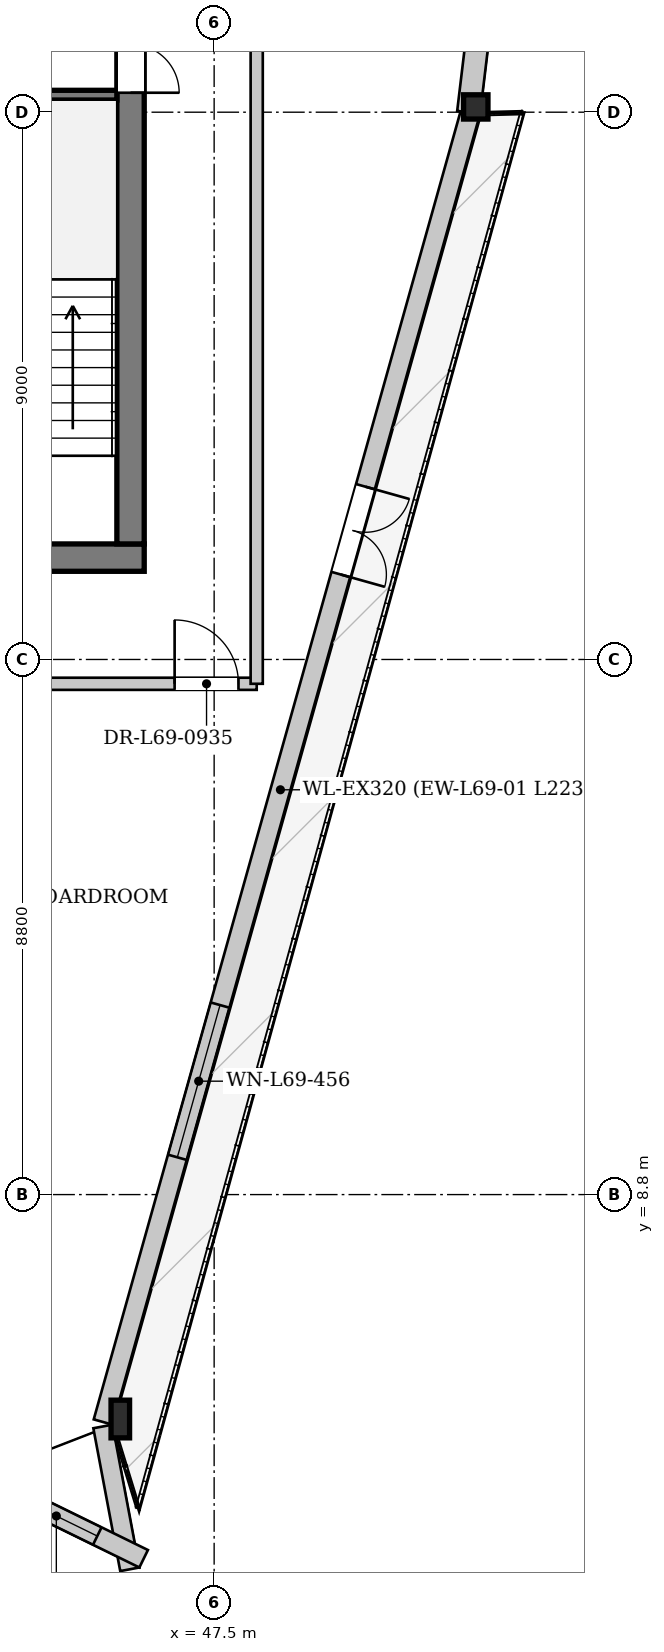
"""IFC4 building model, lengths in metres.
Left out: names, types, materials, properties, quantities, classifications, styles, units other than length and angle.
Written with IfcOpenShell. Run it as: python <this file> out.ifc"""

import sys

from ifc_helpers import new_model, si_unit, direction, frame, frame_2d, origin, origin_2d, place, context, subcontext, project, spatial, rectangle, i_section, extrude, source, transform, mapped, element, fill, save


model = new_model("IFC4")
c1 = context("Model", 3, precision=1e-05, world=origin(), true_north=direction((0.0, 1.0)))
c2 = subcontext(c1, "Body", "Model", "MODEL_VIEW")
j1 = project(units=[si_unit("LENGTHUNIT", "METRE"), si_unit("PLANEANGLEUNIT", "RADIAN")], contexts=[c1])
p1 = place(None, origin())
s1 = spatial("IfcSite", under=j1, at=p1, CompositionType="ELEMENT")
p2 = place(p1, origin())
s2 = spatial("IfcBuilding", under=s1, at=p2, CompositionType="ELEMENT")
p3 = place(p2, frame((0.0, 0.0, 259.7)))
s3 = spatial("IfcBuildingStorey", under=s2, at=p3, CompositionType="ELEMENT", Elevation=259.7)
m1 = source(origin(), c2, "Body", "SweptSolid", [
    extrude(i_section(OverallWidth=0.305, OverallDepth=0.62, WebThickness=0.021, FlangeThickness=0.04, at=origin_2d()), origin(), (0.0, 0.0, 1.0), 3.45),
])
p4 = place(p3, frame((45.828, 5.017, 0.0), z_axis=(0.074735037685, 0.05364503652, 0.995759450971), x_axis=(-0.583128682358, 0.812379800224, 0.0)))
e1 = element("IfcColumn", 1, at=p4, inside=s3, PredefinedType="COLUMN", context=c2, shape_type="MappedRepresentation", body=[
    mapped(m1, transform((0.0, 0.0, 0.0), x_axis=(1.0, 0.0, 0.0), y_axis=(0.0, 1.0, 0.0), z_axis=(0.0, 0.0, 1.0), scale=1.0)),
])
m2 = source(origin(), c2, "Body", "SweptSolid", [
    extrude(i_section(OverallWidth=0.401, OverallDepth=0.399, WebThickness=0.022, FlangeThickness=0.034, at=origin_2d()), origin(), (0.0, 0.0, 1.0), 3.445),
])
p5 = place(p3, frame((51.875, 26.575, 0.0), z_axis=(-0.04145470851, 0.064768553126, 0.997038886738), x_axis=(-0.842254664655, -0.53907984554, 0.0)))
e2 = element("IfcColumn", 2, at=p5, inside=s3, PredefinedType="COLUMN", context=c2, shape_type="MappedRepresentation", body=[
    mapped(m2, transform((0.0, 0.0, 0.0), x_axis=(1.0, 0.0, 0.0), y_axis=(0.0, 1.0, 0.0), z_axis=(0.0, 0.0, 1.0), scale=1.0)),
])
p6 = place(p3, frame((51.72, 26.618, 0.0), z_axis=(0.0, 0.0, 1.0), x_axis=(-0.270053350252, -0.962845360386, 0.0)))
e3 = element("IfcWall", 3, at=p6, inside=s3, PredefinedType="SOLIDWALL", context=c2, shape_type="SweptSolid", body=[
    extrude(rectangle(XDim=22.391, YDim=0.32, at=frame_2d((11.195, 0.0))), origin(), (0.0, 0.0, 1.0), 2.872),
])
p7 = place(p6, frame((6.415, 0.0, 0.0)))
e4 = element("IfcOpeningElement", 4, at=p7, cuts=e3, PredefinedType="OPENING", context=c2, shape_type="SweptSolid", body=[
    extrude(rectangle(XDim=1.5, YDim=2.3, at=frame_2d((0.75, 1.15))), frame((0.0, 0.17, 0.0), z_axis=(0.0, -1.0, 0.0), x_axis=(1.0, 0.0, 0.0)), (0.0, 0.0, 1.0), 0.34),
])
p8 = place(p6, frame((15.269, 0.0, 0.402)))
e5 = element("IfcOpeningElement", 5, at=p8, cuts=e3, PredefinedType="OPENING", context=c2, shape_type="SweptSolid", body=[
    extrude(rectangle(XDim=2.6, YDim=2.35, at=frame_2d((1.3, 1.175))), frame((0.0, 0.17, 0.0), z_axis=(0.0, -1.0, 0.0), x_axis=(1.0, 0.0, 0.0)), (0.0, 0.0, 1.0), 0.34),
])
p9 = place(p3, frame((45.671, 4.987, 0.0), z_axis=(0.0, 0.0, 1.0), x_axis=(0.184966822966, -0.982744765645, 0.0)))
e6 = element("IfcWall", 6, at=p9, inside=s3, PredefinedType="SOLIDWALL", context=c2, shape_type="SweptSolid", body=[
    extrude(rectangle(XDim=2.39, YDim=0.32, at=frame_2d((1.195, 0.0))), origin(), (0.0, 0.0, 1.0), 2.872),
])
p10 = place(p3, frame((46.341, 2.811, 0.0), z_axis=(0.0, 0.0, 1.0), x_axis=(-0.89810639804, 0.439778237068, 0.0)))
e7 = element("IfcWall", 7, at=p10, inside=s3, PredefinedType="SOLIDWALL", context=c2, shape_type="SweptSolid", body=[
    extrude(rectangle(XDim=3.198, YDim=0.32, at=frame_2d((1.599, 0.0))), origin(), (0.0, 0.0, 1.0), 2.872),
])
p11 = place(p10, frame((0.849, 0.0, 0.452)))
e8 = element("IfcOpeningElement", 8, at=p11, cuts=e7, PredefinedType="OPENING", context=c2, shape_type="SweptSolid", body=[
    extrude(rectangle(XDim=1.5, YDim=2.3, at=frame_2d((0.75, 1.15))), frame((0.0, 0.17, 0.0), z_axis=(0.0, -1.0, 0.0), x_axis=(1.0, 0.0, 0.0)), (0.0, 0.0, 1.0), 0.34),
])
p12 = place(p3, frame((54.35, 48.829, 0.0), z_axis=(0.0, 0.0, 1.0), x_axis=(-0.118981834581, -0.992896431175, 0.0)))
e9 = element("IfcWall", 9, at=p12, inside=s3, PredefinedType="SOLIDWALL", context=c2, shape_type="SweptSolid", body=[
    extrude(rectangle(XDim=22.39, YDim=0.38, at=frame_2d((11.195, 0.0))), origin(), (0.0, 0.0, 1.0), 2.872),
])
p13 = place(p12, frame((5.169, 0.0, 0.502)))
e10 = element("IfcOpeningElement", 10, at=p13, cuts=e9, PredefinedType="OPENING", context=c2, shape_type="SweptSolid", body=[
    extrude(rectangle(XDim=2.2, YDim=2.25, at=frame_2d((1.1, 1.125))), frame((0.0, 0.2, 0.0), z_axis=(0.0, -1.0, 0.0), x_axis=(1.0, 0.0, 0.0)), (0.0, 0.0, 1.0), 0.4),
])
p14 = place(p12, frame((15.021, 0.0, 0.502)))
e11 = element("IfcOpeningElement", 11, at=p14, cuts=e9, PredefinedType="OPENING", context=c2, shape_type="SweptSolid", body=[
    extrude(rectangle(XDim=2.2, YDim=2.25, at=frame_2d((1.1, 1.125))), frame((0.0, 0.2, 0.0), z_axis=(0.0, -1.0, 0.0), x_axis=(1.0, 0.0, 0.0)), (0.0, 0.0, 1.0), 0.4),
])
p15 = place(p3, frame((46.35, 19.275, 0.0), z_axis=(0.0, 0.0, 1.0), x_axis=(-1.0, 0.0, 0.0)))
e12 = element("IfcWall", 12, at=p15, inside=s3, PredefinedType="SHEAR", context=c2, shape_type="SweptSolid", body=[
    extrude(rectangle(XDim=16.7, YDim=0.45, at=frame_2d((8.35, 0.0))), origin(), (0.0, 0.0, 1.0), 3.38),
])
p16 = place(p15, frame((4.55, 0.0, 0.0)))
e13 = element("IfcOpeningElement", 13, at=p16, cuts=e12, PredefinedType="OPENING", context=c2, shape_type="SweptSolid", body=[
    extrude(rectangle(XDim=1.12, YDim=2.25, at=frame_2d((0.56, 1.125))), frame((0.0, 0.235, 0.0), z_axis=(0.0, -1.0, 0.0), x_axis=(1.0, 0.0, 0.0)), (0.0, 0.0, 1.0), 0.47),
])
p17 = place(p15, frame((11.05, 0.0, 0.0)))
e14 = element("IfcOpeningElement", 14, at=p17, cuts=e12, PredefinedType="OPENING", context=c2, shape_type="SweptSolid", body=[
    extrude(rectangle(XDim=1.12, YDim=2.25, at=frame_2d((0.56, 1.125))), frame((0.0, 0.235, 0.0), z_axis=(0.0, -1.0, 0.0), x_axis=(1.0, 0.0, 0.0)), (0.0, 0.0, 1.0), 0.47),
])
p18 = place(p3, frame((46.125, 33.7, 0.0), z_axis=(0.0, 0.0, 1.0), x_axis=(0.0, -1.0, 0.0)))
e15 = element("IfcWall", 15, at=p18, inside=s3, PredefinedType="SHEAR", context=c2, shape_type="SweptSolid", body=[
    extrude(rectangle(XDim=14.2, YDim=0.45, at=frame_2d((7.1, 0.0))), origin(), (0.0, 0.0, 1.0), 3.38),
])
p19 = place(p18, frame((5.18, 0.0, 0.0)))
e16 = element("IfcOpeningElement", 16, at=p19, cuts=e15, PredefinedType="OPENING", context=c2, shape_type="SweptSolid", body=[
    extrude(rectangle(XDim=1.6, YDim=2.2, at=frame_2d((0.8, 1.1))), frame((0.0, 0.235, 0.0), z_axis=(0.0, -1.0, 0.0), x_axis=(1.0, 0.0, 0.0)), (0.0, 0.0, 1.0), 0.47),
])
p20 = place(p18, frame((2.05, 0.0, 0.0)))
e17 = element("IfcOpeningElement", 17, at=p20, cuts=e15, PredefinedType="OPENING", context=c2, shape_type="SweptSolid", body=[
    extrude(rectangle(XDim=0.95, YDim=2.1, at=frame_2d((0.475, 1.05))), frame((0.0, 0.235, 0.0), z_axis=(0.0, -1.0, 0.0), x_axis=(1.0, 0.0, 0.0)), (0.0, 0.0, 1.0), 0.47),
])
p21 = place(p3, frame((42.88, 26.88, 0.0), z_axis=(0.0, 0.0, 1.0), x_axis=(1.0, 0.0, 0.0)))
e18 = element("IfcWall", 18, at=p21, inside=s3, PredefinedType="PARTITIONING", context=c2, shape_type="SweptSolid", body=[
    extrude(rectangle(XDim=3.02, YDim=0.16, at=frame_2d((1.51, 0.0))), origin(), (0.0, 0.0, 1.0), 3.38),
])
p22 = place(p3, frame((27.8, 17.2, 0.0), z_axis=(0.0, 0.0, 1.0), x_axis=(1.0, 0.0, 0.0)))
e19 = element("IfcWall", 19, at=p22, inside=s3, PredefinedType="PARTITIONING", context=c2, shape_type="SweptSolid", body=[
    extrude(rectangle(XDim=20.4, YDim=0.2, at=frame_2d((10.2, 0.0))), origin(), (0.0, 0.0, 1.0), 3.38),
])
p23 = place(p22, frame((0.3, 0.0, 0.0)))
e20 = element("IfcOpeningElement", 20, at=p23, cuts=e19, PredefinedType="OPENING", context=c2, shape_type="SweptSolid", body=[
    extrude(rectangle(XDim=1.05, YDim=2.2, at=frame_2d((0.525, 1.1))), frame((0.0, 0.11, 0.0), z_axis=(0.0, -1.0, 0.0), x_axis=(1.0, 0.0, 0.0)), (0.0, 0.0, 1.0), 0.22),
])
p24 = place(p22, frame((19.05, 0.0, 0.0)))
e21 = element("IfcOpeningElement", 21, at=p24, cuts=e19, PredefinedType="OPENING", context=c2, shape_type="SweptSolid", body=[
    extrude(rectangle(XDim=1.05, YDim=2.2, at=frame_2d((0.525, 1.1))), frame((0.0, 0.11, 0.0), z_axis=(0.0, -1.0, 0.0), x_axis=(1.0, 0.0, 0.0)), (0.0, 0.0, 1.0), 0.22),
])
p25 = place(p3, frame((48.2, 17.2, 0.0), z_axis=(0.0, 0.0, 1.0), x_axis=(0.0, 1.0, 0.0)))
e22 = element("IfcWall", 22, at=p25, inside=s3, PredefinedType="PARTITIONING", context=c2, shape_type="SweptSolid", body=[
    extrude(rectangle(XDim=18.8, YDim=0.2, at=frame_2d((9.4, 0.0))), origin(), (0.0, 0.0, 1.0), 3.125),
])
m3 = source(origin(), c2, "Body", "SweptSolid", [
    extrude(rectangle(XDim=1.5, YDim=2.3, at=frame_2d((0.75, 1.15))), frame((0.0, 0.025, 0.0), z_axis=(0.0, -1.0, 0.0), x_axis=(1.0, 0.0, 0.0)), (0.0, 0.0, 1.0), 0.05),
])
p26 = place(p7, origin())
e23 = element("IfcDoor", 23, at=p26, inside=s3, OperationType="DOUBLE_DOOR_SINGLE_SWING", PredefinedType="DOOR", context=c2, shape_type="MappedRepresentation", body=[
    mapped(m3, transform((0.0, 0.0, 0.0), x_axis=(1.0, 0.0, 0.0), y_axis=(0.0, 1.0, 0.0), z_axis=(0.0, 0.0, 1.0), scale=1.0)),
])
fill(e4, e23)
m4 = source(origin(), c2, "Body", "SweptSolid", [
    extrude(rectangle(XDim=2.6, YDim=2.35, at=frame_2d((1.3, 1.175))), frame((0.0, 0.03, 0.0), z_axis=(0.0, -1.0, 0.0), x_axis=(1.0, 0.0, 0.0)), (0.0, 0.0, 1.0), 0.06),
])
p27 = place(p8, origin())
e24 = element("IfcWindow", 24, at=p27, inside=s3, PartitioningType="SINGLE_PANEL", PredefinedType="WINDOW", context=c2, shape_type="MappedRepresentation", body=[
    mapped(m4, transform((0.0, 0.0, 0.0), x_axis=(1.0, 0.0, 0.0), y_axis=(0.0, 1.0, 0.0), z_axis=(0.0, 0.0, 1.0), scale=1.0)),
])
fill(e5, e24)
m5 = source(origin(), c2, "Body", "SweptSolid", [
    extrude(rectangle(XDim=1.5, YDim=2.3, at=frame_2d((0.75, 1.15))), frame((0.0, 0.03, 0.0), z_axis=(0.0, -1.0, 0.0), x_axis=(1.0, 0.0, 0.0)), (0.0, 0.0, 1.0), 0.06),
])
p28 = place(p11, origin())
e25 = element("IfcWindow", 25, at=p28, inside=s3, PartitioningType="SINGLE_PANEL", PredefinedType="WINDOW", context=c2, shape_type="MappedRepresentation", body=[
    mapped(m5, transform((0.0, 0.0, 0.0), x_axis=(1.0, 0.0, 0.0), y_axis=(0.0, 1.0, 0.0), z_axis=(0.0, 0.0, 1.0), scale=1.0)),
])
fill(e8, e25)
m6 = source(origin(), c2, "Body", "SweptSolid", [
    extrude(rectangle(XDim=1.6, YDim=2.2, at=frame_2d((0.8, 1.1))), frame((0.0, 0.025, 0.0), z_axis=(0.0, -1.0, 0.0), x_axis=(1.0, 0.0, 0.0)), (0.0, 0.0, 1.0), 0.05),
])
p29 = place(p19, origin())
e26 = element("IfcDoor", 26, at=p29, inside=s3, OperationType="DOUBLE_DOOR_SINGLE_SWING", PredefinedType="DOOR", context=c2, shape_type="MappedRepresentation", body=[
    mapped(m6, transform((0.0, 0.0, 0.0), x_axis=(1.0, 0.0, 0.0), y_axis=(0.0, 1.0, 0.0), z_axis=(0.0, 0.0, 1.0), scale=1.0)),
])
fill(e16, e26)
m7 = source(origin(), c2, "Body", "SweptSolid", [
    extrude(rectangle(XDim=1.05, YDim=2.2, at=frame_2d((0.525, 1.1))), frame((0.0, 0.025, 0.0), z_axis=(0.0, -1.0, 0.0), x_axis=(1.0, 0.0, 0.0)), (0.0, 0.0, 1.0), 0.05),
])
p30 = place(p24, origin())
e27 = element("IfcDoor", 27, at=p30, inside=s3, OperationType="SINGLE_SWING_LEFT", PredefinedType="DOOR", context=c2, shape_type="MappedRepresentation", body=[
    mapped(m7, transform((0.0, 0.0, 0.0), x_axis=(1.0, 0.0, 0.0), y_axis=(0.0, 1.0, 0.0), z_axis=(0.0, 0.0, 1.0), scale=1.0)),
])
fill(e21, e27)
save(model, sys.argv[1])
